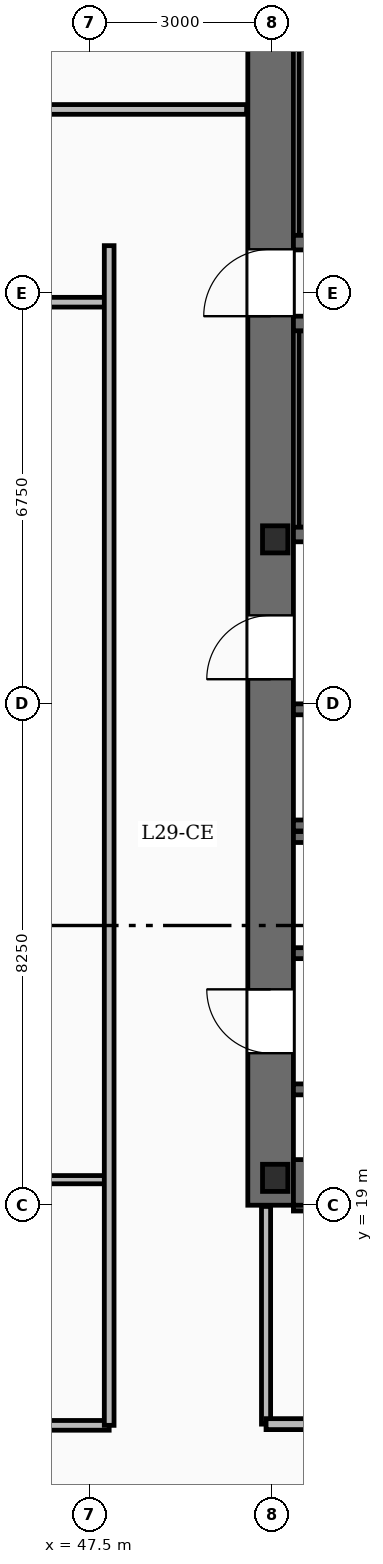
"""IFC4 building model, lengths in metres.
Left out: names, types, materials, properties, quantities, classifications, styles, units other than length and angle.
Written with IfcOpenShell. Run it as: python <this file> out.ifc"""

import sys

from ifc_helpers import new_model, si_unit, direction, frame, frame_2d, origin, origin_2d, place, context, subcontext, project, spatial, rectangle, i_section, extrude, element, fill, save


model = new_model("IFC4")
c1 = context("Model", 3, precision=1e-05, world=origin(), true_north=direction((0.0, 1.0)))
c2 = subcontext(c1, "Body", "Model", "MODEL_VIEW")
j1 = project(units=[si_unit("LENGTHUNIT", "METRE"), si_unit("PLANEANGLEUNIT", "RADIAN")], contexts=[c1])
p1 = place(None, origin())
s1 = spatial("IfcSite", under=j1, at=p1, CompositionType="ELEMENT")
p2 = place(p1, origin())
s2 = spatial("IfcBuilding", under=s1, at=p2, CompositionType="ELEMENT")
p3 = place(p2, frame((0.0, 0.0, 125.95)))
s3 = spatial("IfcBuildingStorey", under=s2, at=p3, CompositionType="ELEMENT", Elevation=125.95)
p4 = place(p3, frame((50.475, 19.0, -0.31), z_axis=(0.0, 0.0, 1.0), x_axis=(0.0, 1.0, 0.0)))
e1 = element("IfcWall", 1, at=p4, inside=s3, PredefinedType="SHEAR", context=c2, shape_type="SweptSolid", body=[
    extrude(rectangle(XDim=20.8, YDim=0.75, at=frame_2d((10.4, 0.0))), origin(), (0.0, 0.0, 1.0), 4.84),
])
p5 = place(p4, frame((2.5, 0.0, 0.31)))
e2 = element("IfcOpeningElement", 2, at=p5, cuts=e1, PredefinedType="OPENING", context=c2, shape_type="SweptSolid", body=[
    extrude(rectangle(XDim=1.05, YDim=2.15, at=frame_2d((0.525, 1.075))), frame((0.0, 0.385, 0.0), z_axis=(0.0, -1.0, 0.0), x_axis=(1.0, 0.0, 0.0)), (0.0, 0.0, 1.0), 0.77),
])
p6 = place(p4, frame((8.65, 0.0, 0.31)))
e3 = element("IfcOpeningElement", 3, at=p6, cuts=e1, PredefinedType="OPENING", context=c2, shape_type="SweptSolid", body=[
    extrude(rectangle(XDim=1.05, YDim=2.15, at=frame_2d((0.525, 1.075))), frame((0.0, 0.385, 0.0), z_axis=(0.0, -1.0, 0.0), x_axis=(1.0, 0.0, 0.0)), (0.0, 0.0, 1.0), 0.77),
])
p7 = place(p4, frame((14.62, 0.0, 0.31)))
e4 = element("IfcOpeningElement", 4, at=p7, cuts=e1, PredefinedType="OPENING", context=c2, shape_type="SweptSolid", body=[
    extrude(rectangle(XDim=1.1, YDim=2.15, at=frame_2d((0.55, 1.075))), frame((0.0, 0.385, 0.0), z_axis=(0.0, -1.0, 0.0), x_axis=(1.0, 0.0, 0.0)), (0.0, 0.0, 1.0), 0.77),
])
p8 = place(p3, frame((50.85, 19.375, -0.31), z_axis=(0.0, 0.0, 1.0), x_axis=(1.0, 0.0, 0.0)))
e5 = element("IfcWall", 5, at=p8, inside=s3, PredefinedType="SHEAR", context=c2, shape_type="SweptSolid", body=[
    extrude(rectangle(XDim=9.2, YDim=0.75, at=frame_2d((4.6, 0.0))), origin(), (0.0, 0.0, 1.0), 4.84),
])
for number, where, z_axis, x_axis in (
    (6, (50.55, 19.45, -0.31), (0.0, 0.0, 1.0), (1.0, 0.0, 0.0)),
    (7, (50.55, 29.95, -0.31), (0.0, 0.0, 1.0), (1.0, 0.0, 0.0)),
):
    element("IfcColumn", number, at=place(p3, frame(where, z_axis=z_axis, x_axis=x_axis)), inside=s3, PredefinedType="COLUMN", context=c2, shape_type="SweptSolid", body=[
        extrude(i_section(OverallWidth=0.416, OverallDepth=0.446, WebThickness=0.039, FlangeThickness=0.063, FilletRadius=0.02, at=origin_2d()), origin(), (0.0, 0.0, 1.0), 4.84),
    ])
p9 = place(p3, frame((60.05, 30.03, 0.0), z_axis=(0.0, 0.0, 1.0), x_axis=(-1.0, 0.0, 0.0)))
e8 = element("IfcWall", 8, at=p9, inside=s3, PredefinedType="SOLIDWALL", context=c2, shape_type="SweptSolid", body=[
    extrude(rectangle(XDim=9.2, YDim=0.24, at=frame_2d((4.6, 0.0))), origin(), (0.0, 0.0, 1.0), 4.53),
])
p10 = place(p9, frame((7.53, 0.0, 0.0)))
e9 = element("IfcOpeningElement", 9, at=p10, cuts=e8, PredefinedType="OPENING", context=c2, shape_type="SweptSolid", body=[
    extrude(rectangle(XDim=1.1, YDim=2.15, at=frame_2d((0.55, 1.075))), frame((0.0, 0.13, 0.0), z_axis=(0.0, -1.0, 0.0), x_axis=(1.0, 0.0, 0.0)), (0.0, 0.0, 1.0), 0.26),
])
p11 = place(p3, frame((50.85, 33.5, 0.0), z_axis=(0.0, 0.0, 1.0), x_axis=(1.0, 0.0, 0.0)))
e10 = element("IfcWall", 10, at=p11, inside=s3, PredefinedType="SOLIDWALL", context=c2, shape_type="SweptSolid", body=[
    extrude(rectangle(XDim=9.2, YDim=0.24, at=frame_2d((4.6, 0.0))), origin(), (0.0, 0.0, 1.0), 4.53),
])
p12 = place(p3, frame((51.06, 30.15, 0.0), z_axis=(0.0, 0.0, 1.0), x_axis=(0.0, 1.0, 0.0)))
e11 = element("IfcWall", 11, at=p12, inside=s3, PredefinedType="SOLIDWALL", context=c2, shape_type="SweptSolid", body=[
    extrude(rectangle(XDim=3.23, YDim=0.24, at=frame_2d((1.615, 0.0))), origin(), (0.0, 0.0, 1.0), 4.53),
])
p13 = place(p3, frame((60.05, 34.83, 0.0), z_axis=(0.0, 0.0, 1.0), x_axis=(-1.0, 0.0, 0.0)))
e12 = element("IfcWall", 12, at=p13, inside=s3, PredefinedType="SOLIDWALL", context=c2, shape_type="SweptSolid", body=[
    extrude(rectangle(XDim=9.2, YDim=0.24, at=frame_2d((4.6, 0.0))), origin(), (0.0, 0.0, 1.0), 4.53),
])
p14 = place(p13, frame((7.57, 0.0, 0.0)))
e13 = element("IfcOpeningElement", 13, at=p14, cuts=e12, PredefinedType="OPENING", context=c2, shape_type="SweptSolid", body=[
    extrude(rectangle(XDim=1.1, YDim=2.15, at=frame_2d((0.55, 1.075))), frame((0.0, 0.13, 0.0), z_axis=(0.0, -1.0, 0.0), x_axis=(1.0, 0.0, 0.0)), (0.0, 0.0, 1.0), 0.26),
])
p15 = place(p3, frame((51.06, 34.95, 0.0), z_axis=(0.0, 0.0, 1.0), x_axis=(0.0, 1.0, 0.0)))
e14 = element("IfcWall", 14, at=p15, inside=s3, PredefinedType="SOLIDWALL", context=c2, shape_type="SweptSolid", body=[
    extrude(rectangle(XDim=3.15, YDim=0.24, at=frame_2d((1.575, 0.0))), origin(), (0.0, 0.0, 1.0), 4.53),
])
p16 = place(p3, frame((50.85, 20.905, 0.0), z_axis=(0.0, 0.0, 1.0), x_axis=(1.0, 0.0, 0.0)))
e15 = element("IfcWall", 15, at=p16, inside=s3, PredefinedType="SOLIDWALL", context=c2, shape_type="SweptSolid", body=[
    extrude(rectangle(XDim=2.94, YDim=0.18, at=frame_2d((1.47, 0.0))), origin(), (0.0, 0.0, 1.0), 4.53),
])
p17 = place(p16, frame((1.01, 0.0, 0.0)))
e16 = element("IfcOpeningElement", 16, at=p17, cuts=e15, PredefinedType="OPENING", context=c2, shape_type="SweptSolid", body=[
    extrude(rectangle(XDim=1.2, YDim=2.2, at=frame_2d((0.6, 1.1))), frame((0.0, 0.1, 0.0), z_axis=(0.0, -1.0, 0.0), x_axis=(1.0, 0.0, 0.0)), (0.0, 0.0, 1.0), 0.2),
])
p18 = place(p3, frame((50.85, 18.995, 0.0), z_axis=(0.0, 0.0, 1.0), x_axis=(1.0, 0.0, 0.0)))
e17 = element("IfcWall", 17, at=p18, inside=s3, PredefinedType="SOLIDWALL", context=c2, shape_type="SweptSolid", body=[
    extrude(rectangle(XDim=2.94, YDim=0.18, at=frame_2d((1.47, 0.0))), origin(), (0.0, 0.0, 1.0), 4.53),
])
p19 = place(p3, frame((50.85, 25.055, 0.0), z_axis=(0.0, 0.0, 1.0), x_axis=(1.0, 0.0, 0.0)))
e18 = element("IfcWall", 18, at=p19, inside=s3, PredefinedType="SOLIDWALL", context=c2, shape_type="SweptSolid", body=[
    extrude(rectangle(XDim=2.927, YDim=0.18, at=frame_2d((1.464, 0.0))), origin(), (0.0, 0.0, 1.0), 4.53),
])
p20 = place(p3, frame((50.85, 23.145, 0.0), z_axis=(0.0, 0.0, 1.0), x_axis=(1.0, 0.0, 0.0)))
e19 = element("IfcWall", 19, at=p20, inside=s3, PredefinedType="SOLIDWALL", context=c2, shape_type="SweptSolid", body=[
    extrude(rectangle(XDim=2.927, YDim=0.18, at=frame_2d((1.464, 0.0))), origin(), (0.0, 0.0, 1.0), 4.53),
])
p21 = place(p20, frame((1.01, 0.0, 0.0)))
e20 = element("IfcOpeningElement", 20, at=p21, cuts=e19, PredefinedType="OPENING", context=c2, shape_type="SweptSolid", body=[
    extrude(rectangle(XDim=1.2, YDim=2.2, at=frame_2d((0.6, 1.1))), frame((0.0, 0.1, 0.0), z_axis=(0.0, -1.0, 0.0), x_axis=(1.0, 0.0, 0.0)), (0.0, 0.0, 1.0), 0.2),
])
p22 = place(p3, frame((50.85, 27.155, 0.0), z_axis=(0.0, 0.0, 1.0), x_axis=(1.0, 0.0, 0.0)))
e21 = element("IfcWall", 21, at=p22, inside=s3, PredefinedType="SOLIDWALL", context=c2, shape_type="SweptSolid", body=[
    extrude(rectangle(XDim=3.015, YDim=0.18, at=frame_2d((1.507, 0.0))), origin(), (0.0, 0.0, 1.0), 4.53),
])
p23 = place(p22, frame((0.935, 0.0, 0.0)))
e22 = element("IfcOpeningElement", 22, at=p23, cuts=e21, PredefinedType="OPENING", context=c2, shape_type="SweptSolid", body=[
    extrude(rectangle(XDim=1.35, YDim=2.3, at=frame_2d((0.675, 1.15))), frame((0.0, 0.1, 0.0), z_axis=(0.0, -1.0, 0.0), x_axis=(1.0, 0.0, 0.0)), (0.0, 0.0, 1.0), 0.2),
])
p24 = place(p3, frame((50.85, 25.245, 0.0), z_axis=(0.0, 0.0, 1.0), x_axis=(1.0, 0.0, 0.0)))
e23 = element("IfcWall", 23, at=p24, inside=s3, PredefinedType="SOLIDWALL", context=c2, shape_type="SweptSolid", body=[
    extrude(rectangle(XDim=3.015, YDim=0.18, at=frame_2d((1.507, 0.0))), origin(), (0.0, 0.0, 1.0), 4.53),
])
p25 = place(p3, frame((50.4, 15.4, 0.0), z_axis=(0.0, 0.0, 1.0), x_axis=(1.0, 0.0, 0.0)))
e24 = element("IfcWall", 24, at=p25, inside=s3, PredefinedType="SOLIDWALL", context=c2, shape_type="SweptSolid", body=[
    extrude(rectangle(XDim=10.0, YDim=0.18, at=frame_2d((5.0, 0.0))), origin(), (0.0, 0.0, 1.0), 3.59),
])
p26 = place(p25, frame((1.94, 0.0, 0.0)))
e25 = element("IfcOpeningElement", 25, at=p26, cuts=e24, PredefinedType="OPENING", context=c2, shape_type="SweptSolid", body=[
    extrude(rectangle(XDim=0.92, YDim=2.1, at=frame_2d((0.46, 1.05))), frame((0.0, 0.1, 0.0), z_axis=(0.0, -1.0, 0.0), x_axis=(1.0, 0.0, 0.0)), (0.0, 0.0, 1.0), 0.2),
])
p27 = place(p25, frame((6.97, 0.0, 0.0)))
e26 = element("IfcOpeningElement", 26, at=p27, cuts=e24, PredefinedType="OPENING", context=c2, shape_type="SweptSolid", body=[
    extrude(rectangle(XDim=0.86, YDim=2.05, at=frame_2d((0.43, 1.025))), frame((0.0, 0.1, 0.0), z_axis=(0.0, -1.0, 0.0), x_axis=(1.0, 0.0, 0.0)), (0.0, 0.0, 1.0), 0.2),
])
p28 = place(p3, frame((50.4, 15.4, 0.0), z_axis=(0.0, 0.0, 1.0), x_axis=(0.0, 1.0, 0.0)))
e27 = element("IfcWall", 27, at=p28, inside=s3, PredefinedType="PARTITIONING", context=c2, shape_type="SweptSolid", body=[
    extrude(rectangle(XDim=3.58, YDim=0.15, at=frame_2d((1.79, 0.0))), origin(), (0.0, 0.0, 1.0), 3.59),
])
p29 = place(p3, frame((27.08, 19.42, 0.0), z_axis=(0.0, 0.0, 1.0), x_axis=(1.0, 0.0, 0.0)))
e28 = element("IfcWall", 28, at=p29, inside=s3, PredefinedType="PARTITIONING", context=c2, shape_type="SweptSolid", body=[
    extrude(rectangle(XDim=20.74, YDim=0.135, at=frame_2d((10.37, 0.0))), origin(), (0.0, 0.0, 1.0), 3.59),
])
p30 = place(p29, frame((1.6, 0.0, 0.0)))
e29 = element("IfcOpeningElement", 29, at=p30, cuts=e28, PredefinedType="OPENING", context=c2, shape_type="SweptSolid", body=[
    extrude(rectangle(XDim=1.6, YDim=2.15, at=frame_2d((0.8, 1.075))), frame((0.0, 0.077, 0.0), z_axis=(0.0, -1.0, 0.0), x_axis=(1.0, 0.0, 0.0)), (0.0, 0.0, 1.0), 0.155),
])
p31 = place(p29, frame((14.2, 0.0, 0.0)))
e30 = element("IfcOpeningElement", 30, at=p31, cuts=e28, PredefinedType="OPENING", context=c2, shape_type="SweptSolid", body=[
    extrude(rectangle(XDim=1.6, YDim=2.15, at=frame_2d((0.8, 1.075))), frame((0.0, 0.077, 0.0), z_axis=(0.0, -1.0, 0.0), x_axis=(1.0, 0.0, 0.0)), (0.0, 0.0, 1.0), 0.155),
])
p32 = place(p3, frame((27.08, 33.85, 0.0), z_axis=(0.0, 0.0, 1.0), x_axis=(1.0, 0.0, 0.0)))
e31 = element("IfcWall", 31, at=p32, inside=s3, PredefinedType="PARTITIONING", context=c2, shape_type="SweptSolid", body=[
    extrude(rectangle(XDim=20.74, YDim=0.16, at=frame_2d((10.37, 0.0))), origin(), (0.0, 0.0, 1.0), 3.59),
])
p33 = place(p3, frame((27.08, 15.38, 0.0), z_axis=(0.0, 0.0, 1.0), x_axis=(1.0, 0.0, 0.0)))
e32 = element("IfcWall", 32, at=p33, inside=s3, PredefinedType="PARTITIONING", context=c2, shape_type="SweptSolid", body=[
    extrude(rectangle(XDim=20.74, YDim=0.16, at=frame_2d((10.37, 0.0))), origin(), (0.0, 0.0, 1.0), 3.59),
])
p34 = place(p33, frame((9.5, 0.0, 0.0)))
e33 = element("IfcOpeningElement", 33, at=p34, cuts=e32, PredefinedType="OPENING", context=c2, shape_type="SweptSolid", body=[
    extrude(rectangle(XDim=1.6, YDim=2.15, at=frame_2d((0.8, 1.075))), frame((0.0, 0.09, 0.0), z_axis=(0.0, -1.0, 0.0), x_axis=(1.0, 0.0, 0.0)), (0.0, 0.0, 1.0), 0.18),
])
p35 = place(p3, frame((47.82, 15.38, 0.0), z_axis=(0.0, 0.0, 1.0), x_axis=(0.0, 1.0, 0.0)))
e34 = element("IfcWall", 34, at=p35, inside=s3, PredefinedType="PARTITIONING", context=c2, shape_type="SweptSolid", body=[
    extrude(rectangle(XDim=19.4, YDim=0.16, at=frame_2d((9.7, 0.0))), origin(), (0.0, 0.0, 1.0), 3.59),
])
p36 = place(p3, frame((24.82, 37.02, 0.0), z_axis=(0.0, 0.0, 1.0), x_axis=(1.0, 0.0, 0.0)))
e35 = element("IfcWall", 35, at=p36, inside=s3, PredefinedType="PARTITIONING", context=c2, shape_type="SweptSolid", body=[
    extrude(rectangle(XDim=25.26, YDim=0.16, at=frame_2d((12.63, 0.0))), origin(), (0.0, 0.0, 1.0), 3.59),
])
p37 = place(p36, frame((3.5, 0.0, 0.0)))
e36 = element("IfcOpeningElement", 36, at=p37, cuts=e35, PredefinedType="OPENING", context=c2, shape_type="SweptSolid", body=[
    extrude(rectangle(XDim=1.6, YDim=2.15, at=frame_2d((0.8, 1.075))), frame((0.0, 0.09, 0.0), z_axis=(0.0, -1.0, 0.0), x_axis=(1.0, 0.0, 0.0)), (0.0, 0.0, 1.0), 0.18),
])
p38 = place(p36, frame((17.5, 0.0, 0.0)))
e37 = element("IfcOpeningElement", 37, at=p38, cuts=e35, PredefinedType="OPENING", context=c2, shape_type="SweptSolid", body=[
    extrude(rectangle(XDim=1.6, YDim=2.15, at=frame_2d((0.8, 1.075))), frame((0.0, 0.09, 0.0), z_axis=(0.0, -1.0, 0.0), x_axis=(1.0, 0.0, 0.0)), (0.0, 0.0, 1.0), 0.18),
])
p39 = place(p5, origin())
e38 = element("IfcDoor", 38, at=p39, inside=s3, OperationType="SINGLE_SWING_RIGHT", PredefinedType="DOOR", context=c2, shape_type="SweptSolid", body=[
    extrude(rectangle(XDim=1.05, YDim=2.15, at=frame_2d((0.525, 1.075))), frame((0.0, 0.025, 0.0), z_axis=(0.0, -1.0, 0.0), x_axis=(1.0, 0.0, 0.0)), (0.0, 0.0, 1.0), 0.05),
])
fill(e2, e38)
p40 = place(p6, origin())
e39 = element("IfcDoor", 39, at=p40, inside=s3, OperationType="SINGLE_SWING_LEFT", PredefinedType="DOOR", context=c2, shape_type="SweptSolid", body=[
    extrude(rectangle(XDim=1.05, YDim=2.15, at=frame_2d((0.525, 1.075))), frame((0.0, 0.025, 0.0), z_axis=(0.0, -1.0, 0.0), x_axis=(1.0, 0.0, 0.0)), (0.0, 0.0, 1.0), 0.05),
])
fill(e3, e39)
p41 = place(p7, origin())
e40 = element("IfcDoor", 40, at=p41, inside=s3, OperationType="SINGLE_SWING_LEFT", PredefinedType="DOOR", context=c2, shape_type="SweptSolid", body=[
    extrude(rectangle(XDim=1.1, YDim=2.15, at=frame_2d((0.55, 1.075))), frame((0.0, 0.025, 0.0), z_axis=(0.0, -1.0, 0.0), x_axis=(1.0, 0.0, 0.0)), (0.0, 0.0, 1.0), 0.05),
])
fill(e4, e40)
save(model, sys.argv[1])
